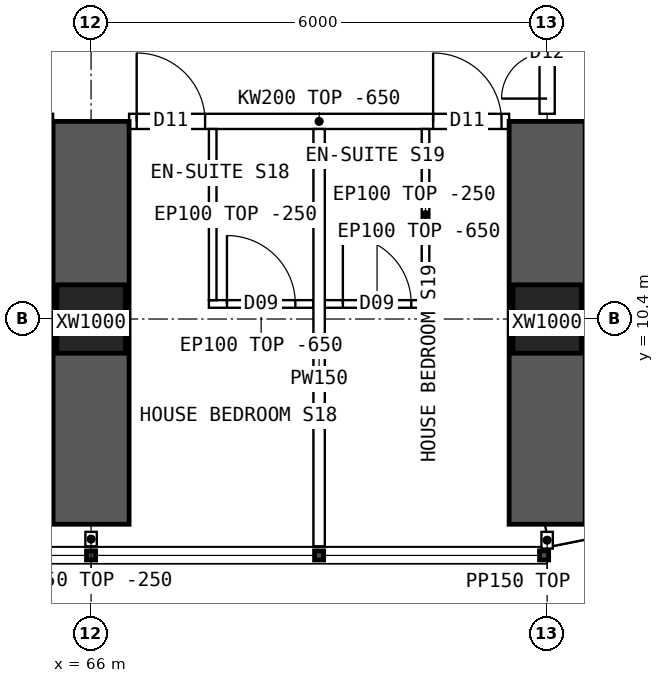
"""IFC4 building model, lengths in metres.
Left out: names, types, materials, properties, quantities, classifications, styles, units other than length and angle.
Written with IfcOpenShell. Run it as: python <this file> out.ifc"""

import sys

from ifc_helpers import new_model, si_unit, direction, frame, frame_2d, origin, origin_2d, place, context, subcontext, project, spatial, polyline, rectangle, hollow_rectangle, outline, extrude, element, fill, save


model = new_model("IFC4")
c1 = context("Model", 3, precision=1e-05, world=origin(), true_north=direction((0.0, 1.0)))
c2 = subcontext(c1, "Body", "Model", "MODEL_VIEW")
j1 = project(units=[si_unit("LENGTHUNIT", "METRE"), si_unit("PLANEANGLEUNIT", "RADIAN")], contexts=[c1])
p1 = place(None, origin())
s1 = spatial("IfcSite", under=j1, at=p1, CompositionType="ELEMENT")
p2 = place(p1, origin())
s2 = spatial("IfcBuilding", under=s1, at=p2, CompositionType="ELEMENT")
p3 = place(p2, frame((0.0, 0.0, 38.95)))
s3 = spatial("IfcBuildingStorey", under=s2, at=p3, CompositionType="ELEMENT", Elevation=38.95)
for number, where, z_axis, x_axis in (
    (1, (66.0, 10.4, 0.0), (0.0, 0.0, 1.0), (1.0, 0.0, 0.0)),
    (2, (72.0, 10.4, 0.0), (0.0, 0.0, 1.0), (1.0, 0.0, 0.0)),
):
    element("IfcColumn", number, at=place(p3, frame(where, z_axis=z_axis, x_axis=x_axis)), inside=s3, PredefinedType="COLUMN", context=c2, shape_type="SweptSolid", body=[
        extrude(hollow_rectangle(XDim=0.9, YDim=0.9, WallThickness=0.09, at=origin_2d()), origin(), (0.0, 0.0, 1.0), 3.75),
    ])
for number, where, z_axis, x_axis in (
    (3, (66.0, 7.7, 0.0), (0.0, 0.0, 1.0), (0.0, 1.0, 0.0)),
    (4, (72.0, 7.7, 0.0), (0.0, 0.0, 1.0), (0.0, 1.0, 0.0)),
):
    element("IfcWall", number, at=place(p3, frame(where, z_axis=z_axis, x_axis=x_axis)), inside=s3, PredefinedType="SHEAR", context=c2, shape_type="SweptSolid", body=[
        extrude(rectangle(XDim=5.3, YDim=1.0, at=frame_2d((2.65, 0.0))), origin(), (0.0, 0.0, 1.0), 3.75),
    ])
p4 = place(p3, frame((72.0, 7.55, 0.0), z_axis=(0.0, 0.0, 1.0), x_axis=(0.980787251524, 0.195080412259, 0.0)))
e5 = element("IfcWall", 5, at=p4, inside=s3, PredefinedType="SOLIDWALL", context=c2, shape_type="SweptSolid", body=[
    extrude(outline(polyline([(-0.03, -0.15), (3.249, -0.15), (3.189, 0.15), (0.03, 0.15), (-0.03, -0.15)])), origin(), (0.0, 0.0, 1.0), 3.5),
])
p5 = place(p4, frame((0.909, 0.0, 0.9)))
e6 = element("IfcOpeningElement", 6, at=p5, cuts=e5, PredefinedType="OPENING", context=c2, shape_type="SweptSolid", body=[
    extrude(rectangle(XDim=1.4, YDim=1.8, at=frame_2d((0.7, 0.9))), frame((0.0, 0.16, 0.0), z_axis=(0.0, -1.0, 0.0), x_axis=(1.0, 0.0, 0.0)), (0.0, 0.0, 1.0), 0.32),
])
p6 = place(p3, frame((66.5, 13.0, 0.0), z_axis=(0.0, 0.0, 1.0), x_axis=(1.0, 0.0, 0.0)))
e7 = element("IfcWall", 7, at=p6, inside=s3, PredefinedType="SOLIDWALL", context=c2, shape_type="SweptSolid", body=[
    extrude(outline(polyline([(0.0, 0.0), (5.0, 0.0), (5.0, 3.1), (0.0, 3.1), (0.0, 0.0)])), frame((0.0, 0.1, 0.0), z_axis=(0.0, -1.0, 0.0), x_axis=(1.0, 0.0, 0.0)), (0.0, 0.0, 1.0), 0.2),
])
p7 = place(p6, frame((0.1, 0.0, 0.0)))
e8 = element("IfcOpeningElement", 8, at=p7, cuts=e7, PredefinedType="OPENING", context=c2, shape_type="SweptSolid", body=[
    extrude(rectangle(XDim=0.9, YDim=2.1, at=frame_2d((0.45, 1.05))), frame((0.0, 0.11, 0.0), z_axis=(0.0, -1.0, 0.0), x_axis=(1.0, 0.0, 0.0)), (0.0, 0.0, 1.0), 0.22),
])
p8 = place(p6, frame((4.0, 0.0, 0.0)))
e9 = element("IfcOpeningElement", 9, at=p8, cuts=e7, PredefinedType="OPENING", context=c2, shape_type="SweptSolid", body=[
    extrude(rectangle(XDim=0.9, YDim=2.1, at=frame_2d((0.45, 1.05))), frame((0.0, 0.11, 0.0), z_axis=(0.0, -1.0, 0.0), x_axis=(1.0, 0.0, 0.0)), (0.0, 0.0, 1.0), 0.22),
])
p9 = place(p3, frame((69.0, 7.41, 0.0), z_axis=(0.0, 0.0, 1.0), x_axis=(0.0, 1.0, 0.0)))
e10 = element("IfcWall", 10, at=p9, inside=s3, PredefinedType="PARTITIONING", context=c2, shape_type="SweptSolid", body=[
    extrude(outline(polyline([(0.0, 0.0), (5.49, 0.0), (5.49, 3.1), (5.442, 3.1), (5.44, 3.5), (3.192, 3.5), (3.19, 3.1), (2.792, 3.1), (2.79, 3.5), (0.0, 3.5), (0.0, 0.0)])), frame((0.0, 0.075, 0.0), z_axis=(0.0, -1.0, 0.0), x_axis=(1.0, 0.0, 0.0)), (0.0, 0.0, 1.0), 0.15),
])
p10 = place(p3, frame((68.925, 10.598, 0.0), z_axis=(0.0, 0.0, 1.0), x_axis=(-1.0, 0.0, 0.0)))
e11 = element("IfcWall", 11, at=p10, inside=s3, PredefinedType="PARTITIONING", context=c2, shape_type="SweptSolid", body=[
    extrude(outline(polyline([(0.0, 0.0), (1.375, 0.0), (1.375, 3.1), (0.0, 3.1), (0.0, 0.0)])), frame((0.0, 0.05, 0.0), z_axis=(0.0, -1.0, 0.0), x_axis=(1.0, 0.0, 0.0)), (0.0, 0.0, 1.0), 0.1),
])
p11 = place(p10, frame((0.238, 0.0, 0.0)))
e12 = element("IfcOpeningElement", 12, at=p11, cuts=e11, PredefinedType="OPENING", context=c2, shape_type="SweptSolid", body=[
    extrude(rectangle(XDim=0.9, YDim=2.1, at=frame_2d((0.45, 1.05))), frame((0.0, 0.06, 0.0), z_axis=(0.0, -1.0, 0.0), x_axis=(1.0, 0.0, 0.0)), (0.0, 0.0, 1.0), 0.12),
])
p12 = place(p3, frame((67.6, 10.648, 0.0), z_axis=(0.0, 0.0, 1.0), x_axis=(0.0, 1.0, 0.0)))
e13 = element("IfcWall", 13, at=p12, inside=s3, PredefinedType="PARTITIONING", context=c2, shape_type="SweptSolid", body=[
    extrude(outline(polyline([(0.0, 0.0), (2.252, 0.0), (2.252, 3.1), (2.204, 3.1), (2.202, 3.5), (0.0, 3.5), (0.0, 0.0)])), frame((0.0, 0.05, 0.0), z_axis=(0.0, -1.0, 0.0), x_axis=(1.0, 0.0, 0.0)), (0.0, 0.0, 1.0), 0.1),
])
p13 = place(p3, frame((70.45, 10.598, 0.0), z_axis=(0.0, 0.0, 1.0), x_axis=(-1.0, 0.0, 0.0)))
e14 = element("IfcWall", 14, at=p13, inside=s3, PredefinedType="PARTITIONING", context=c2, shape_type="SweptSolid", body=[
    extrude(outline(polyline([(0.0, 0.0), (1.375, 0.0), (1.375, 3.1), (0.0, 3.1), (0.0, 0.0)])), frame((0.0, 0.05, 0.0), z_axis=(0.0, -1.0, 0.0), x_axis=(1.0, 0.0, 0.0)), (0.0, 0.0, 1.0), 0.1),
])
p14 = place(p13, frame((0.238, 0.0, 0.0)))
e15 = element("IfcOpeningElement", 15, at=p14, cuts=e14, PredefinedType="OPENING", context=c2, shape_type="SweptSolid", body=[
    extrude(rectangle(XDim=0.9, YDim=2.1, at=frame_2d((0.45, 1.05))), frame((0.0, 0.06, 0.0), z_axis=(0.0, -1.0, 0.0), x_axis=(1.0, 0.0, 0.0)), (0.0, 0.0, 1.0), 0.12),
])
p15 = place(p3, frame((70.4, 10.648, 0.0), z_axis=(0.0, 0.0, 1.0), x_axis=(0.0, 1.0, 0.0)))
e16 = element("IfcWall", 16, at=p15, inside=s3, PredefinedType="PARTITIONING", context=c2, shape_type="SweptSolid", body=[
    extrude(outline(polyline([(0.0, 0.0), (2.252, 0.0), (2.252, 3.1), (2.204, 3.1), (2.202, 3.5), (0.0, 3.5), (0.0, 0.0)])), frame((0.0, 0.05, 0.0), z_axis=(0.0, -1.0, 0.0), x_axis=(1.0, 0.0, 0.0)), (0.0, 0.0, 1.0), 0.1),
])
p16 = place(p3, frame((72.0, 13.1, 0.0), z_axis=(0.0, 0.0, 1.0), x_axis=(0.0, 1.0, 0.0)))
e17 = element("IfcWall", 17, at=p16, inside=s3, PredefinedType="SOLIDWALL", context=c2, shape_type="SweptSolid", body=[
    extrude(outline(polyline([(0.0, 0.0), (1.6, 0.0), (1.6, 3.05), (0.0, 3.05), (0.0, 0.0)])), frame((0.0, 0.1, 0.0), z_axis=(0.0, -1.0, 0.0), x_axis=(1.0, 0.0, 0.0)), (0.0, 0.0, 1.0), 0.2),
])
p17 = place(p16, frame((0.2, 0.0, 0.0)))
e18 = element("IfcOpeningElement", 18, at=p17, cuts=e17, PredefinedType="OPENING", context=c2, shape_type="SweptSolid", body=[
    extrude(rectangle(XDim=1.2, YDim=2.1, at=frame_2d((0.6, 1.05))), frame((0.0, 0.11, 0.0), z_axis=(0.0, -1.0, 0.0), x_axis=(1.0, 0.0, 0.0)), (0.0, 0.0, 1.0), 0.22),
])
p18 = place(p3, frame((66.0, 7.6, 0.0), z_axis=(0.0, 0.0, 1.0), x_axis=(0.0, -1.0, 0.0)))
e19 = element("IfcWall", 19, at=p18, inside=s3, PredefinedType="PARTITIONING", context=c2, shape_type="SweptSolid", body=[
    extrude(rectangle(XDim=0.19, YDim=0.15, at=frame_2d((0.095, 0.0))), origin(), (0.0, 0.0, 1.0), 3.5),
])
p19 = place(p3, frame((72.0, 7.6, 0.0), z_axis=(0.0, 0.0, 1.0), x_axis=(0.0, -1.0, 0.0)))
e20 = element("IfcWall", 20, at=p19, inside=s3, PredefinedType="PARTITIONING", context=c2, shape_type="SweptSolid", body=[
    extrude(rectangle(XDim=0.22, YDim=0.15, at=frame_2d((0.11, 0.0))), origin(), (0.0, 0.0, 1.0), 3.5),
])
p20 = place(p11, origin())
e21 = element("IfcDoor", 21, at=p20, inside=s3, OperationType="SINGLE_SWING_RIGHT", PredefinedType="DOOR", context=c2, shape_type="SweptSolid", body=[
    extrude(rectangle(XDim=0.9, YDim=2.1, at=frame_2d((0.45, 1.05))), frame((0.0, 0.025, 0.0), z_axis=(0.0, -1.0, 0.0), x_axis=(1.0, 0.0, 0.0)), (0.0, 0.0, 1.0), 0.05),
])
fill(e12, e21)
p21 = place(p7, origin())
e22 = element("IfcDoor", 22, at=p21, inside=s3, OperationType="SINGLE_SWING_LEFT", PredefinedType="DOOR", context=c2, shape_type="SweptSolid", body=[
    extrude(rectangle(XDim=0.9, YDim=2.1, at=frame_2d((0.45, 1.05))), frame((0.0, 0.025, 0.0), z_axis=(0.0, -1.0, 0.0), x_axis=(1.0, 0.0, 0.0)), (0.0, 0.0, 1.0), 0.05),
])
fill(e8, e22)
p22 = place(p14, origin())
e23 = element("IfcDoor", 23, at=p22, inside=s3, OperationType="SINGLE_SWING_RIGHT", PredefinedType="DOOR", context=c2, shape_type="SweptSolid", body=[
    extrude(rectangle(XDim=0.9, YDim=2.1, at=frame_2d((0.45, 1.05))), frame((0.0, 0.025, 0.0), z_axis=(0.0, -1.0, 0.0), x_axis=(1.0, 0.0, 0.0)), (0.0, 0.0, 1.0), 0.05),
])
fill(e15, e23)
p23 = place(p8, origin())
e24 = element("IfcDoor", 24, at=p23, inside=s3, OperationType="SINGLE_SWING_LEFT", PredefinedType="DOOR", context=c2, shape_type="SweptSolid", body=[
    extrude(rectangle(XDim=0.9, YDim=2.1, at=frame_2d((0.45, 1.05))), frame((0.0, 0.025, 0.0), z_axis=(0.0, -1.0, 0.0), x_axis=(1.0, 0.0, 0.0)), (0.0, 0.0, 1.0), 0.05),
])
fill(e9, e24)
p24 = place(p17, origin())
e25 = element("IfcDoor", 25, at=p24, inside=s3, OperationType="DOUBLE_DOOR_SINGLE_SWING", PredefinedType="DOOR", context=c2, shape_type="SweptSolid", body=[
    extrude(rectangle(XDim=1.2, YDim=2.1, at=frame_2d((0.6, 1.05))), frame((0.0, 0.025, 0.0), z_axis=(0.0, -1.0, 0.0), x_axis=(1.0, 0.0, 0.0)), (0.0, 0.0, 1.0), 0.05),
])
fill(e18, e25)
save(model, sys.argv[1])
